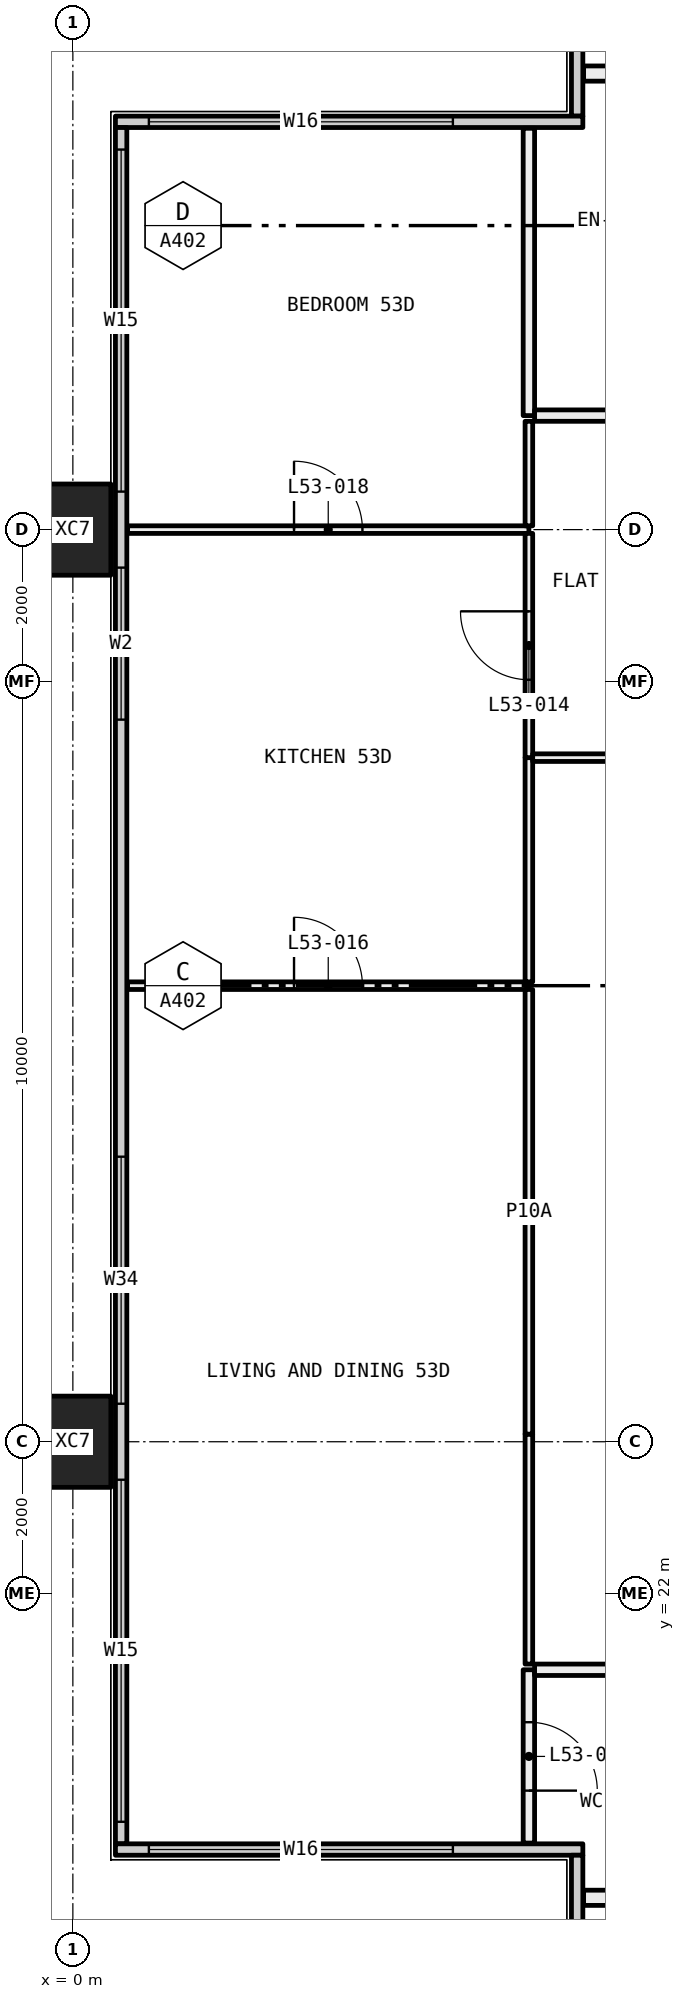
"""IFC4 building model, lengths in metres.
Left out: names, types, materials, properties, quantities, classifications, styles, units other than length and angle.
Written with IfcOpenShell. Run it as: python <this file> out.ifc"""

import sys

from ifc_helpers import new_model, si_unit, direction, frame, frame_2d, origin, origin_2d, place, context, subcontext, project, spatial, rectangle, hollow_rectangle, extrude, element, fill, save


model = new_model("IFC4")
c1 = context("Model", 3, precision=1e-05, world=origin(), true_north=direction((0.0, 1.0)))
c2 = subcontext(c1, "Body", "Model", "MODEL_VIEW")
j1 = project(units=[si_unit("LENGTHUNIT", "METRE"), si_unit("PLANEANGLEUNIT", "RADIAN")], contexts=[c1])
p1 = place(None, origin())
s1 = spatial("IfcSite", under=j1, at=p1, CompositionType="ELEMENT")
p2 = place(p1, origin())
s2 = spatial("IfcBuilding", under=s1, at=p2, CompositionType="ELEMENT")
p3 = place(p2, frame((0.0, 0.0, 199.65)))
s3 = spatial("IfcBuildingStorey", under=s2, at=p3, CompositionType="ELEMENT", Elevation=199.65)
for number, where, z_axis, x_axis in (
    (1, (0.0, 24.0, -0.4), (0.0, 0.0, 1.0), (0.0, 1.0, 0.0)),
    (2, (0.0, 36.0, -0.4), (0.0, 0.0, 1.0), (0.0, 1.0, 0.0)),
):
    element("IfcColumn", number, at=place(p3, frame(where, z_axis=z_axis, x_axis=x_axis)), inside=s3, PredefinedType="COLUMN", context=c2, shape_type="SweptSolid", body=[
        extrude(hollow_rectangle(XDim=1.2, YDim=1.0, WallThickness=0.045, at=origin_2d()), origin(), (0.0, 0.0, 1.0), 3.45),
    ])
p4 = place(p3, frame((6.635, 41.44, 0.0), z_axis=(0.0, 0.0, 1.0), x_axis=(0.0, 1.0, 0.0)))
e3 = element("IfcWall", 3, at=p4, inside=s3, PredefinedType="ELEMENTEDWALL", context=c2, shape_type="SweptSolid", body=[
    extrude(rectangle(XDim=5.85, YDim=0.15, at=frame_2d((2.925, 0.0))), origin(), (0.0, 0.0, 1.0), 3.05),
])
p5 = place(p4, frame((1.56, 0.0, 0.45)))
e4 = element("IfcOpeningElement", 4, at=p5, cuts=e3, PredefinedType="OPENING", context=c2, shape_type="SweptSolid", body=[
    extrude(rectangle(XDim=4.0, YDim=2.55, at=frame_2d((2.0, 1.275))), frame((0.0, 0.085, 0.0), z_axis=(0.0, -1.0, 0.0), x_axis=(1.0, 0.0, 0.0)), (0.0, 0.0, 1.0), 0.17),
])
p6 = place(p3, frame((0.56, 41.365, 0.0), z_axis=(0.0, 0.0, 1.0), x_axis=(1.0, 0.0, 0.0)))
e5 = element("IfcWall", 5, at=p6, inside=s3, PredefinedType="ELEMENTEDWALL", context=c2, shape_type="SweptSolid", body=[
    extrude(rectangle(XDim=6.15, YDim=0.15, at=frame_2d((3.075, 0.0))), origin(), (0.0, 0.0, 1.0), 3.05),
])
p7 = place(p6, frame((0.44, 0.0, 0.45)))
e6 = element("IfcOpeningElement", 6, at=p7, cuts=e5, PredefinedType="OPENING", context=c2, shape_type="SweptSolid", body=[
    extrude(rectangle(XDim=4.0, YDim=2.55, at=frame_2d((2.0, 1.275))), frame((0.0, 0.085, 0.0), z_axis=(0.0, -1.0, 0.0), x_axis=(1.0, 0.0, 0.0)), (0.0, 0.0, 1.0), 0.17),
])
p8 = place(p3, frame((0.635, 18.71, 0.0), z_axis=(0.0, 0.0, 1.0), x_axis=(0.0, 1.0, 0.0)))
e7 = element("IfcWall", 7, at=p8, inside=s3, PredefinedType="ELEMENTEDWALL", context=c2, shape_type="SweptSolid", body=[
    extrude(rectangle(XDim=22.58, YDim=0.15, at=frame_2d((11.29, 0.0))), origin(), (0.0, 0.0, 1.0), 3.05),
])
p9 = place(p8, frame((0.29, 0.0, 0.45)))
e8 = element("IfcOpeningElement", 8, at=p9, cuts=e7, PredefinedType="OPENING", context=c2, shape_type="SweptSolid", body=[
    extrude(rectangle(XDim=4.5, YDim=2.55, at=frame_2d((2.25, 1.275))), frame((0.0, 0.085, 0.0), z_axis=(0.0, -1.0, 0.0), x_axis=(1.0, 0.0, 0.0)), (0.0, 0.0, 1.0), 0.17),
])
p10 = place(p8, frame((5.79, 0.0, 0.45)))
e9 = element("IfcOpeningElement", 9, at=p10, cuts=e7, PredefinedType="OPENING", context=c2, shape_type="SweptSolid", body=[
    extrude(rectangle(XDim=3.25, YDim=2.55, at=frame_2d((1.625, 1.275))), frame((0.0, 0.085, 0.0), z_axis=(0.0, -1.0, 0.0), x_axis=(1.0, 0.0, 0.0)), (0.0, 0.0, 1.0), 0.17),
])
p11 = place(p8, frame((14.79, 0.0, 0.45)))
e10 = element("IfcOpeningElement", 10, at=p11, cuts=e7, PredefinedType="OPENING", context=c2, shape_type="SweptSolid", body=[
    extrude(rectangle(XDim=2.0, YDim=2.55, at=frame_2d((1.0, 1.275))), frame((0.0, 0.085, 0.0), z_axis=(0.0, -1.0, 0.0), x_axis=(1.0, 0.0, 0.0)), (0.0, 0.0, 1.0), 0.17),
])
p12 = place(p8, frame((17.79, 0.0, 0.45)))
e11 = element("IfcOpeningElement", 11, at=p12, cuts=e7, PredefinedType="OPENING", context=c2, shape_type="SweptSolid", body=[
    extrude(rectangle(XDim=4.5, YDim=2.55, at=frame_2d((2.25, 1.275))), frame((0.0, 0.085, 0.0), z_axis=(0.0, -1.0, 0.0), x_axis=(1.0, 0.0, 0.0)), (0.0, 0.0, 1.0), 0.17),
])
p13 = place(p3, frame((0.56, 18.635, 0.0), z_axis=(0.0, 0.0, 1.0), x_axis=(1.0, 0.0, 0.0)))
e12 = element("IfcWall", 12, at=p13, inside=s3, PredefinedType="ELEMENTEDWALL", context=c2, shape_type="SweptSolid", body=[
    extrude(rectangle(XDim=6.15, YDim=0.15, at=frame_2d((3.075, 0.0))), origin(), (0.0, 0.0, 1.0), 3.05),
])
p14 = place(p13, frame((0.44, 0.0, 0.45)))
e13 = element("IfcOpeningElement", 13, at=p14, cuts=e12, PredefinedType="OPENING", context=c2, shape_type="SweptSolid", body=[
    extrude(rectangle(XDim=4.0, YDim=2.55, at=frame_2d((2.0, 1.275))), frame((0.0, 0.085, 0.0), z_axis=(0.0, -1.0, 0.0), x_axis=(1.0, 0.0, 0.0)), (0.0, 0.0, 1.0), 0.17),
])
p15 = place(p3, frame((6.635, 12.71, 0.0), z_axis=(0.0, 0.0, 1.0), x_axis=(0.0, 1.0, 0.0)))
e14 = element("IfcWall", 14, at=p15, inside=s3, PredefinedType="ELEMENTEDWALL", context=c2, shape_type="SweptSolid", body=[
    extrude(rectangle(XDim=5.85, YDim=0.15, at=frame_2d((2.925, 0.0))), origin(), (0.0, 0.0, 1.0), 3.05),
])
p16 = place(p15, frame((0.29, 0.0, 0.45)))
e15 = element("IfcOpeningElement", 15, at=p16, cuts=e14, PredefinedType="OPENING", context=c2, shape_type="SweptSolid", body=[
    extrude(rectangle(XDim=4.0, YDim=2.55, at=frame_2d((2.0, 1.275))), frame((0.0, 0.085, 0.0), z_axis=(0.0, -1.0, 0.0), x_axis=(1.0, 0.0, 0.0)), (0.0, 0.0, 1.0), 0.17),
])
p17 = place(p3, frame((7.8, 18.0, 0.0), z_axis=(0.0, 0.0, 1.0), x_axis=(-1.0, 0.0, 0.0)))
e16 = element("IfcWall", 16, at=p17, inside=s3, PredefinedType="PARTITIONING", context=c2, shape_type="SweptSolid", body=[
    extrude(rectangle(XDim=1.08, YDim=0.2, at=frame_2d((0.54, 0.0))), origin(), (0.0, 0.0, 1.0), 3.05),
])
p18 = place(p3, frame((6.72, 42.0, 0.0), z_axis=(0.0, 0.0, 1.0), x_axis=(1.0, 0.0, 0.0)))
e17 = element("IfcWall", 17, at=p18, inside=s3, PredefinedType="PARTITIONING", context=c2, shape_type="SweptSolid", body=[
    extrude(rectangle(XDim=3.38, YDim=0.2, at=frame_2d((1.69, 0.0))), origin(), (0.0, 0.0, 1.0), 3.05),
])
p19 = place(p3, frame((6.0, 30.0, 0.0), z_axis=(0.0, 0.0, 1.0), x_axis=(-1.0, 0.0, 0.0)))
e18 = element("IfcWall", 18, at=p19, inside=s3, PredefinedType="PARTITIONING", context=c2, shape_type="SweptSolid", body=[
    extrude(rectangle(XDim=5.28, YDim=0.1, at=frame_2d((2.64, 0.0))), origin(), (0.0, 0.0, 1.0), 3.05),
])
p20 = place(p19, frame((2.19, 0.0, 0.0)))
e19 = element("IfcOpeningElement", 19, at=p20, cuts=e18, PredefinedType="OPENING", context=c2, shape_type="SweptSolid", body=[
    extrude(rectangle(XDim=0.9, YDim=2.1, at=frame_2d((0.45, 1.05))), frame((0.0, 0.06, 0.0), z_axis=(0.0, -1.0, 0.0), x_axis=(1.0, 0.0, 0.0)), (0.0, 0.0, 1.0), 0.12),
])
p21 = place(p3, frame((6.0, 18.72, 0.0), z_axis=(0.0, 0.0, 1.0), x_axis=(0.0, 1.0, 0.0)))
e20 = element("IfcWall", 20, at=p21, inside=s3, PredefinedType="PARTITIONING", context=c2, shape_type="SweptSolid", body=[
    extrude(rectangle(XDim=2.28, YDim=0.15, at=frame_2d((1.14, 0.0))), origin(), (0.0, 0.0, 1.0), 3.05),
])
p22 = place(p21, frame((0.69, 0.0, 0.0)))
e21 = element("IfcOpeningElement", 21, at=p22, cuts=e20, PredefinedType="OPENING", context=c2, shape_type="SweptSolid", body=[
    extrude(rectangle(XDim=0.9, YDim=2.1, at=frame_2d((0.45, 1.05))), frame((0.0, 0.085, 0.0), z_axis=(0.0, -1.0, 0.0), x_axis=(1.0, 0.0, 0.0)), (0.0, 0.0, 1.0), 0.17),
])
p23 = place(p3, frame((6.0, 21.075, 0.0), z_axis=(0.0, 0.0, 1.0), x_axis=(0.0, 1.0, 0.0)))
e22 = element("IfcWall", 22, at=p23, inside=s3, PredefinedType="PARTITIONING", context=c2, shape_type="SweptSolid", body=[
    extrude(rectangle(XDim=3.025, YDim=0.1, at=frame_2d((1.513, 0.0))), origin(), (0.0, 0.0, 1.0), 2.45),
])
p24 = place(p3, frame((6.0, 24.1, 0.0), z_axis=(0.0, 0.0, 1.0), x_axis=(0.0, 1.0, 0.0)))
e23 = element("IfcWall", 23, at=p24, inside=s3, PredefinedType="PARTITIONING", context=c2, shape_type="SweptSolid", body=[
    extrude(rectangle(XDim=5.85, YDim=0.1, at=frame_2d((2.925, 0.0))), origin(), (0.0, 0.0, 1.0), 3.05),
])
p25 = place(p3, frame((6.0, 36.0, 0.0), z_axis=(0.0, 0.0, 1.0), x_axis=(-1.0, 0.0, 0.0)))
e24 = element("IfcWall", 24, at=p25, inside=s3, PredefinedType="PARTITIONING", context=c2, shape_type="SweptSolid", body=[
    extrude(rectangle(XDim=5.28, YDim=0.1, at=frame_2d((2.64, 0.0))), origin(), (0.0, 0.0, 1.0), 2.45),
])
p26 = place(p25, frame((2.19, 0.0, 0.0)))
e25 = element("IfcOpeningElement", 25, at=p26, cuts=e24, PredefinedType="OPENING", context=c2, shape_type="SweptSolid", body=[
    extrude(rectangle(XDim=0.9, YDim=2.1, at=frame_2d((0.45, 1.05))), frame((0.0, 0.06, 0.0), z_axis=(0.0, -1.0, 0.0), x_axis=(1.0, 0.0, 0.0)), (0.0, 0.0, 1.0), 0.12),
])
p27 = place(p3, frame((6.0, 30.05, 0.0), z_axis=(0.0, 0.0, 1.0), x_axis=(0.0, 1.0, 0.0)))
e26 = element("IfcWall", 26, at=p27, inside=s3, PredefinedType="PARTITIONING", context=c2, shape_type="SweptSolid", body=[
    extrude(rectangle(XDim=2.95, YDim=0.1, at=frame_2d((1.475, 0.0))), origin(), (0.0, 0.0, 1.0), 3.05),
])
p28 = place(p3, frame((6.0, 33.0, 0.0), z_axis=(0.0, 0.0, 1.0), x_axis=(0.0, 1.0, 0.0)))
e27 = element("IfcWall", 27, at=p28, inside=s3, PredefinedType="PARTITIONING", context=c2, shape_type="SweptSolid", body=[
    extrude(rectangle(XDim=2.95, YDim=0.1, at=frame_2d((1.475, 0.0))), origin(), (0.0, 0.0, 1.0), 2.45),
])
p29 = place(p28, frame((1.025, 0.0, 0.0)))
e28 = element("IfcOpeningElement", 28, at=p29, cuts=e27, PredefinedType="OPENING", context=c2, shape_type="SweptSolid", body=[
    extrude(rectangle(XDim=0.9, YDim=2.1, at=frame_2d((0.45, 1.05))), frame((0.0, 0.06, 0.0), z_axis=(0.0, -1.0, 0.0), x_axis=(1.0, 0.0, 0.0)), (0.0, 0.0, 1.0), 0.12),
])
p30 = place(p3, frame((6.0, 36.05, 0.0), z_axis=(0.0, 0.0, 1.0), x_axis=(0.0, 1.0, 0.0)))
e29 = element("IfcWall", 29, at=p30, inside=s3, PredefinedType="PARTITIONING", context=c2, shape_type="SweptSolid", body=[
    extrude(rectangle(XDim=1.375, YDim=0.1, at=frame_2d((0.688, 0.0))), origin(), (0.0, 0.0, 1.0), 2.45),
])
p31 = place(p3, frame((6.0, 37.5, 0.0), z_axis=(0.0, 0.0, 1.0), x_axis=(0.0, 1.0, 0.0)))
e30 = element("IfcWall", 30, at=p31, inside=s3, PredefinedType="PARTITIONING", context=c2, shape_type="SweptSolid", body=[
    extrude(rectangle(XDim=3.78, YDim=0.15, at=frame_2d((1.89, 0.0))), origin(), (0.0, 0.0, 1.0), 3.05),
])
p32 = place(p3, frame((7.725, 21.0, 0.0), z_axis=(0.0, 0.0, 1.0), x_axis=(-1.0, 0.0, 0.0)))
e31 = element("IfcWall", 31, at=p32, inside=s3, PredefinedType="PARTITIONING", context=c2, shape_type="SweptSolid", body=[
    extrude(rectangle(XDim=1.65, YDim=0.15, at=frame_2d((0.825, 0.0))), origin(), (0.0, 0.0, 1.0), 3.05),
])
p33 = place(p3, frame((10.0, 33.0, 0.0), z_axis=(0.0, 0.0, 1.0), x_axis=(-1.0, 0.0, 0.0)))
e32 = element("IfcWall", 32, at=p33, inside=s3, PredefinedType="PARTITIONING", context=c2, shape_type="SweptSolid", body=[
    extrude(rectangle(XDim=3.95, YDim=0.1, at=frame_2d((1.975, 0.0))), origin(), (0.0, 0.0, 1.0), 3.05),
])
p34 = place(p33, frame((1.525, 0.0, 0.0)))
e33 = element("IfcOpeningElement", 33, at=p34, cuts=e32, PredefinedType="OPENING", context=c2, shape_type="SweptSolid", body=[
    extrude(rectangle(XDim=0.9, YDim=2.1, at=frame_2d((0.45, 1.05))), frame((0.0, 0.06, 0.0), z_axis=(0.0, -1.0, 0.0), x_axis=(1.0, 0.0, 0.0)), (0.0, 0.0, 1.0), 0.12),
])
p35 = place(p3, frame((10.0, 37.5, 0.0), z_axis=(0.0, 0.0, 1.0), x_axis=(-1.0, 0.0, 0.0)))
e34 = element("IfcWall", 34, at=p35, inside=s3, PredefinedType="PARTITIONING", context=c2, shape_type="SweptSolid", body=[
    extrude(rectangle(XDim=3.925, YDim=0.15, at=frame_2d((1.962, 0.0))), origin(), (0.0, 0.0, 1.0), 3.05),
])
p36 = place(p35, frame((1.512, 0.0, 0.0)))
e35 = element("IfcOpeningElement", 35, at=p36, cuts=e34, PredefinedType="OPENING", context=c2, shape_type="SweptSolid", body=[
    extrude(rectangle(XDim=0.9, YDim=2.1, at=frame_2d((0.45, 1.05))), frame((0.0, 0.085, 0.0), z_axis=(0.0, -1.0, 0.0), x_axis=(1.0, 0.0, 0.0)), (0.0, 0.0, 1.0), 0.17),
])
p37 = place(p7, origin())
e36 = element("IfcWindow", 36, at=p37, inside=s3, PartitioningType="SINGLE_PANEL", PredefinedType="WINDOW", context=c2, shape_type="SweptSolid", body=[
    extrude(rectangle(XDim=4.0, YDim=2.55, at=frame_2d((2.0, 1.275))), frame((0.0, 0.03, 0.0), z_axis=(0.0, -1.0, 0.0), x_axis=(1.0, 0.0, 0.0)), (0.0, 0.0, 1.0), 0.06),
])
fill(e6, e36)
p38 = place(p9, origin())
e37 = element("IfcWindow", 37, at=p38, inside=s3, PartitioningType="SINGLE_PANEL", PredefinedType="WINDOW", context=c2, shape_type="SweptSolid", body=[
    extrude(rectangle(XDim=4.5, YDim=2.55, at=frame_2d((2.25, 1.275))), frame((0.0, 0.03, 0.0), z_axis=(0.0, -1.0, 0.0), x_axis=(1.0, 0.0, 0.0)), (0.0, 0.0, 1.0), 0.06),
])
fill(e8, e37)
p39 = place(p10, origin())
e38 = element("IfcWindow", 38, at=p39, inside=s3, PartitioningType="SINGLE_PANEL", PredefinedType="WINDOW", context=c2, shape_type="SweptSolid", body=[
    extrude(rectangle(XDim=3.25, YDim=2.55, at=frame_2d((1.625, 1.275))), frame((0.0, 0.03, 0.0), z_axis=(0.0, -1.0, 0.0), x_axis=(1.0, 0.0, 0.0)), (0.0, 0.0, 1.0), 0.06),
])
fill(e9, e38)
p40 = place(p11, origin())
e39 = element("IfcWindow", 39, at=p40, inside=s3, PartitioningType="SINGLE_PANEL", PredefinedType="WINDOW", context=c2, shape_type="SweptSolid", body=[
    extrude(rectangle(XDim=2.0, YDim=2.55, at=frame_2d((1.0, 1.275))), frame((0.0, 0.03, 0.0), z_axis=(0.0, -1.0, 0.0), x_axis=(1.0, 0.0, 0.0)), (0.0, 0.0, 1.0), 0.06),
])
fill(e10, e39)
p41 = place(p12, origin())
e40 = element("IfcWindow", 40, at=p41, inside=s3, PartitioningType="SINGLE_PANEL", PredefinedType="WINDOW", context=c2, shape_type="SweptSolid", body=[
    extrude(rectangle(XDim=4.5, YDim=2.55, at=frame_2d((2.25, 1.275))), frame((0.0, 0.03, 0.0), z_axis=(0.0, -1.0, 0.0), x_axis=(1.0, 0.0, 0.0)), (0.0, 0.0, 1.0), 0.06),
])
fill(e11, e40)
p42 = place(p14, origin())
e41 = element("IfcWindow", 41, at=p42, inside=s3, PartitioningType="SINGLE_PANEL", PredefinedType="WINDOW", context=c2, shape_type="SweptSolid", body=[
    extrude(rectangle(XDim=4.0, YDim=2.55, at=frame_2d((2.0, 1.275))), frame((0.0, 0.03, 0.0), z_axis=(0.0, -1.0, 0.0), x_axis=(1.0, 0.0, 0.0)), (0.0, 0.0, 1.0), 0.06),
])
fill(e13, e41)
p43 = place(p29, origin())
e42 = element("IfcDoor", 42, at=p43, inside=s3, OperationType="SINGLE_SWING_LEFT", PredefinedType="DOOR", context=c2, shape_type="SweptSolid", body=[
    extrude(rectangle(XDim=0.9, YDim=2.1, at=frame_2d((0.45, 1.05))), frame((0.0, 0.025, 0.0), z_axis=(0.0, -1.0, 0.0), x_axis=(1.0, 0.0, 0.0)), (0.0, 0.0, 1.0), 0.05),
])
fill(e28, e42)
p44 = place(p20, frame((0.9, 0.0, 0.0), x_axis=(-1.0, 0.0, 0.0)))
e43 = element("IfcDoor", 43, at=p44, inside=s3, OperationType="SINGLE_SWING_RIGHT", PredefinedType="DOOR", context=c2, shape_type="SweptSolid", body=[
    extrude(rectangle(XDim=0.9, YDim=2.1, at=frame_2d((0.45, 1.05))), frame((0.0, 0.025, 0.0), z_axis=(0.0, -1.0, 0.0), x_axis=(1.0, 0.0, 0.0)), (0.0, 0.0, 1.0), 0.05),
])
fill(e19, e43)
p45 = place(p26, frame((0.9, 0.0, 0.0), x_axis=(-1.0, 0.0, 0.0)))
e44 = element("IfcDoor", 44, at=p45, inside=s3, OperationType="SINGLE_SWING_RIGHT", PredefinedType="DOOR", context=c2, shape_type="SweptSolid", body=[
    extrude(rectangle(XDim=0.9, YDim=2.1, at=frame_2d((0.45, 1.05))), frame((0.0, 0.025, 0.0), z_axis=(0.0, -1.0, 0.0), x_axis=(1.0, 0.0, 0.0)), (0.0, 0.0, 1.0), 0.05),
])
fill(e25, e44)
p46 = place(p22, frame((0.9, 0.0, 0.0), x_axis=(-1.0, 0.0, 0.0)))
e45 = element("IfcDoor", 45, at=p46, inside=s3, OperationType="SINGLE_SWING_LEFT", PredefinedType="DOOR", context=c2, shape_type="SweptSolid", body=[
    extrude(rectangle(XDim=0.9, YDim=2.1, at=frame_2d((0.45, 1.05))), frame((0.0, 0.025, 0.0), z_axis=(0.0, -1.0, 0.0), x_axis=(1.0, 0.0, 0.0)), (0.0, 0.0, 1.0), 0.05),
])
fill(e21, e45)
save(model, sys.argv[1])
